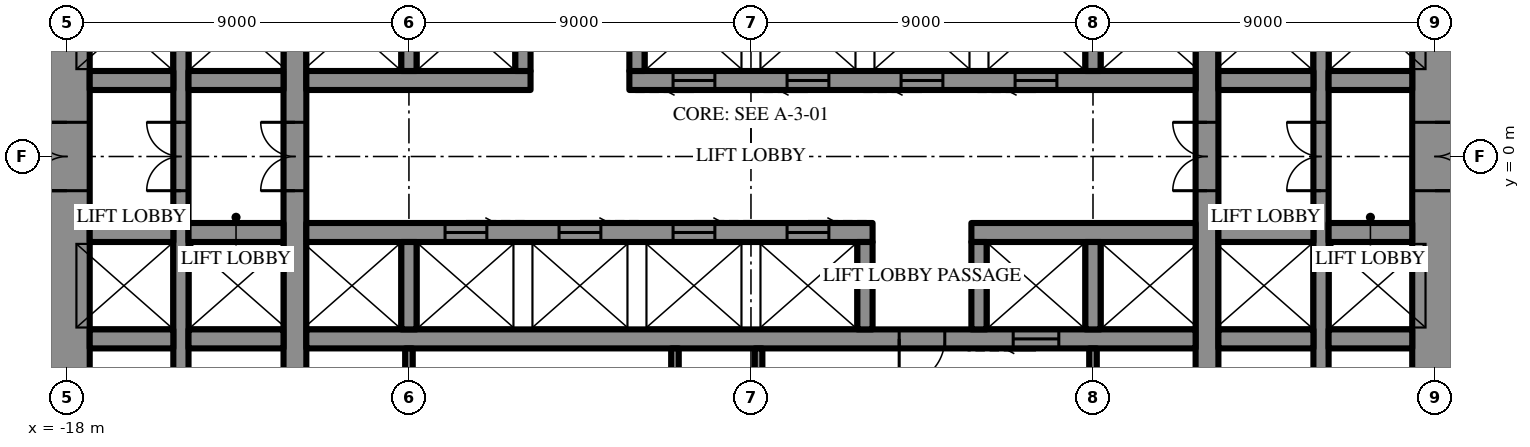
"""IFC4 building model, lengths in metres.
Left out: names, types, materials, properties, quantities, classifications, styles, units other than length and angle.
Written with IfcOpenShell. Run it as: python <this file> out.ifc"""

import sys

from ifc_helpers import new_model, si_unit, direction, frame, frame_2d, origin, place, context, subcontext, project, spatial, rectangle, extrude, element, fill, save


model = new_model("IFC4")
c1 = context("Model", 3, precision=1e-05, world=origin(), true_north=direction((0.0, 1.0)))
c2 = subcontext(c1, "Body", "Model", "MODEL_VIEW")
j1 = project(units=[si_unit("LENGTHUNIT", "METRE"), si_unit("PLANEANGLEUNIT", "RADIAN")], contexts=[c1])
p1 = place(None, origin())
s1 = spatial("IfcSite", under=j1, at=p1, CompositionType="ELEMENT")
p2 = place(p1, origin())
s2 = spatial("IfcBuilding", under=s1, at=p2, CompositionType="ELEMENT")
p3 = place(p2, frame((0.0, 0.0, 99.1)))
s3 = spatial("IfcBuildingStorey", under=s2, at=p3, CompositionType="ELEMENT", Elevation=99.1)
p4 = place(p3, frame((18.0, -10.7, 0.0), z_axis=(0.0, 0.0, 1.0), x_axis=(0.0, 1.0, 0.0)))
e1 = element("IfcWall", 1, at=p4, inside=s3, PredefinedType="SHEAR", context=c2, shape_type="SweptSolid", body=[
    extrude(rectangle(XDim=21.4, YDim=1.2, at=frame_2d((10.7, 0.0))), origin(), (0.0, 0.0, 1.0), 4.2),
])
p5 = place(p4, frame((9.8, 0.0, 0.0)))
e2 = element("IfcOpeningElement", 2, at=p5, cuts=e1, PredefinedType="OPENING", context=c2, shape_type="SweptSolid", body=[
    extrude(rectangle(XDim=1.8, YDim=2.4, at=frame_2d((0.9, 1.2))), frame((0.0, 0.61, 0.0), z_axis=(0.0, -1.0, 0.0), x_axis=(1.0, 0.0, 0.0)), (0.0, 0.0, 1.0), 1.22),
])
p6 = place(p3, frame((-18.0, 10.7, 0.0), z_axis=(0.0, 0.0, 1.0), x_axis=(0.0, -1.0, 0.0)))
e3 = element("IfcWall", 3, at=p6, inside=s3, PredefinedType="SHEAR", context=c2, shape_type="SweptSolid", body=[
    extrude(rectangle(XDim=21.4, YDim=1.2, at=frame_2d((10.7, 0.0))), origin(), (0.0, 0.0, 1.0), 4.2),
])
p7 = place(p6, frame((9.8, 0.0, 0.0)))
e4 = element("IfcOpeningElement", 4, at=p7, cuts=e3, PredefinedType="OPENING", context=c2, shape_type="SweptSolid", body=[
    extrude(rectangle(XDim=1.8, YDim=2.4, at=frame_2d((0.9, 1.2))), frame((0.0, 0.61, 0.0), z_axis=(0.0, -1.0, 0.0), x_axis=(1.0, 0.0, 0.0)), (0.0, 0.0, 1.0), 1.22),
])
p8 = place(p3, frame((12.0, -10.7, 0.0), z_axis=(0.0, 0.0, 1.0), x_axis=(0.0, 1.0, 0.0)))
e5 = element("IfcWall", 5, at=p8, inside=s3, PredefinedType="SHEAR", context=c2, shape_type="SweptSolid", body=[
    extrude(rectangle(XDim=21.4, YDim=0.6, at=frame_2d((10.7, 0.0))), origin(), (0.0, 0.0, 1.0), 4.2),
])
p9 = place(p8, frame((9.8, 0.0, 0.0)))
e6 = element("IfcOpeningElement", 6, at=p9, cuts=e5, PredefinedType="OPENING", context=c2, shape_type="SweptSolid", body=[
    extrude(rectangle(XDim=1.8, YDim=2.4, at=frame_2d((0.9, 1.2))), frame((0.0, 0.31, 0.0), z_axis=(0.0, -1.0, 0.0), x_axis=(1.0, 0.0, 0.0)), (0.0, 0.0, 1.0), 0.62),
])
p10 = place(p3, frame((-12.0, -10.7, 0.0), z_axis=(0.0, 0.0, 1.0), x_axis=(0.0, 1.0, 0.0)))
e7 = element("IfcWall", 7, at=p10, inside=s3, PredefinedType="SHEAR", context=c2, shape_type="SweptSolid", body=[
    extrude(rectangle(XDim=21.4, YDim=0.6, at=frame_2d((10.7, 0.0))), origin(), (0.0, 0.0, 1.0), 4.2),
])
p11 = place(p10, frame((9.8, 0.0, 0.0)))
e8 = element("IfcOpeningElement", 8, at=p11, cuts=e7, PredefinedType="OPENING", context=c2, shape_type="SweptSolid", body=[
    extrude(rectangle(XDim=1.8, YDim=2.4, at=frame_2d((0.9, 1.2))), frame((0.0, 0.31, 0.0), z_axis=(0.0, -1.0, 0.0), x_axis=(1.0, 0.0, 0.0)), (0.0, 0.0, 1.0), 0.62),
])
p12 = place(p3, frame((15.0, -10.7, 0.0), z_axis=(0.0, 0.0, 1.0), x_axis=(0.0, 1.0, 0.0)))
e9 = element("IfcWall", 9, at=p12, inside=s3, PredefinedType="SHEAR", context=c2, shape_type="SweptSolid", body=[
    extrude(rectangle(XDim=21.4, YDim=0.4, at=frame_2d((10.7, 0.0))), origin(), (0.0, 0.0, 1.0), 4.2),
])
p13 = place(p12, frame((9.8, 0.0, 0.0)))
e10 = element("IfcOpeningElement", 10, at=p13, cuts=e9, PredefinedType="OPENING", context=c2, shape_type="SweptSolid", body=[
    extrude(rectangle(XDim=1.8, YDim=2.4, at=frame_2d((0.9, 1.2))), frame((0.0, 0.21, 0.0), z_axis=(0.0, -1.0, 0.0), x_axis=(1.0, 0.0, 0.0)), (0.0, 0.0, 1.0), 0.42),
])
p14 = place(p3, frame((-15.0, -10.7, 0.0), z_axis=(0.0, 0.0, 1.0), x_axis=(0.0, 1.0, 0.0)))
e11 = element("IfcWall", 11, at=p14, inside=s3, PredefinedType="SHEAR", context=c2, shape_type="SweptSolid", body=[
    extrude(rectangle(XDim=21.4, YDim=0.4, at=frame_2d((10.7, 0.0))), origin(), (0.0, 0.0, 1.0), 4.2),
])
p15 = place(p14, frame((9.8, 0.0, 0.0)))
e12 = element("IfcOpeningElement", 12, at=p15, cuts=e11, PredefinedType="OPENING", context=c2, shape_type="SweptSolid", body=[
    extrude(rectangle(XDim=1.8, YDim=2.4, at=frame_2d((0.9, 1.2))), frame((0.0, 0.21, 0.0), z_axis=(0.0, -1.0, 0.0), x_axis=(1.0, 0.0, 0.0)), (0.0, 0.0, 1.0), 0.42),
])
p16 = place(p3, frame((-17.4, 2.0, 0.0), z_axis=(0.0, 0.0, 1.0), x_axis=(1.0, 0.0, 0.0)))
e13 = element("IfcWall", 13, at=p16, inside=s3, PredefinedType="SHEAR", context=c2, shape_type="SweptSolid", body=[
    extrude(rectangle(XDim=2.2, YDim=0.5, at=frame_2d((1.1, 0.0))), origin(), (0.0, 0.0, 1.0), 4.2),
])
p17 = place(p3, frame((-14.8, 2.0, 0.0), z_axis=(0.0, 0.0, 1.0), x_axis=(1.0, 0.0, 0.0)))
e14 = element("IfcWall", 14, at=p17, inside=s3, PredefinedType="SHEAR", context=c2, shape_type="SweptSolid", body=[
    extrude(rectangle(XDim=2.5, YDim=0.5, at=frame_2d((1.25, 0.0))), origin(), (0.0, 0.0, 1.0), 4.2),
])
p18 = place(p3, frame((-11.7, 2.0, 0.0), z_axis=(0.0, 0.0, 1.0), x_axis=(1.0, 0.0, 0.0)))
e15 = element("IfcWall", 15, at=p18, inside=s3, PredefinedType="SHEAR", context=c2, shape_type="SweptSolid", body=[
    extrude(rectangle(XDim=5.9, YDim=0.5, at=frame_2d((2.95, 0.0))), origin(), (0.0, 0.0, 1.0), 4.2),
])
p19 = place(p3, frame((-3.2, 2.0, 0.0), z_axis=(0.0, 0.0, 1.0), x_axis=(1.0, 0.0, 0.0)))
e16 = element("IfcWall", 16, at=p19, inside=s3, PredefinedType="SHEAR", context=c2, shape_type="SweptSolid", body=[
    extrude(rectangle(XDim=14.9, YDim=0.5, at=frame_2d((7.45, 0.0))), origin(), (0.0, 0.0, 1.0), 4.2),
])
p20 = place(p19, frame((1.15, 0.0, 0.0)))
e17 = element("IfcOpeningElement", 17, at=p20, cuts=e16, PredefinedType="OPENING", context=c2, shape_type="SweptSolid", body=[
    extrude(rectangle(XDim=1.1, YDim=2.2, at=frame_2d((0.55, 1.1))), frame((0.0, 0.26, 0.0), z_axis=(0.0, -1.0, 0.0), x_axis=(1.0, 0.0, 0.0)), (0.0, 0.0, 1.0), 0.52),
])
p21 = place(p19, frame((4.15, 0.0, 0.0)))
e18 = element("IfcOpeningElement", 18, at=p21, cuts=e16, PredefinedType="OPENING", context=c2, shape_type="SweptSolid", body=[
    extrude(rectangle(XDim=1.1, YDim=2.2, at=frame_2d((0.55, 1.1))), frame((0.0, 0.26, 0.0), z_axis=(0.0, -1.0, 0.0), x_axis=(1.0, 0.0, 0.0)), (0.0, 0.0, 1.0), 0.52),
])
p22 = place(p19, frame((7.15, 0.0, 0.0)))
e19 = element("IfcOpeningElement", 19, at=p22, cuts=e16, PredefinedType="OPENING", context=c2, shape_type="SweptSolid", body=[
    extrude(rectangle(XDim=1.1, YDim=2.2, at=frame_2d((0.55, 1.1))), frame((0.0, 0.26, 0.0), z_axis=(0.0, -1.0, 0.0), x_axis=(1.0, 0.0, 0.0)), (0.0, 0.0, 1.0), 0.52),
])
p23 = place(p19, frame((10.15, 0.0, 0.0)))
e20 = element("IfcOpeningElement", 20, at=p23, cuts=e16, PredefinedType="OPENING", context=c2, shape_type="SweptSolid", body=[
    extrude(rectangle(XDim=1.1, YDim=2.2, at=frame_2d((0.55, 1.1))), frame((0.0, 0.26, 0.0), z_axis=(0.0, -1.0, 0.0), x_axis=(1.0, 0.0, 0.0)), (0.0, 0.0, 1.0), 0.52),
])
p24 = place(p3, frame((12.3, 2.0, 0.0), z_axis=(0.0, 0.0, 1.0), x_axis=(1.0, 0.0, 0.0)))
e21 = element("IfcWall", 21, at=p24, inside=s3, PredefinedType="SHEAR", context=c2, shape_type="SweptSolid", body=[
    extrude(rectangle(XDim=2.5, YDim=0.5, at=frame_2d((1.25, 0.0))), origin(), (0.0, 0.0, 1.0), 4.2),
])
p25 = place(p3, frame((15.2, 2.0, 0.0), z_axis=(0.0, 0.0, 1.0), x_axis=(1.0, 0.0, 0.0)))
e22 = element("IfcWall", 22, at=p25, inside=s3, PredefinedType="SHEAR", context=c2, shape_type="SweptSolid", body=[
    extrude(rectangle(XDim=2.2, YDim=0.5, at=frame_2d((1.1, 0.0))), origin(), (0.0, 0.0, 1.0), 4.2),
])
for number, where, z_axis, x_axis in (
    (23, (-9.0, 2.25, 0.0), (0.0, 0.0, 1.0), (0.0, 1.0, 0.0)),
    (24, (-6.0, 2.25, 0.0), (0.0, 0.0, 1.0), (0.0, 1.0, 0.0)),
    (25, (-3.0, 2.25, 0.0), (0.0, 0.0, 1.0), (0.0, 1.0, 0.0)),
    (26, (9.0, 2.25, 0.0), (0.0, 0.0, 1.0), (0.0, 1.0, 0.0)),
):
    element("IfcWall", number, at=place(p3, frame(where, z_axis=z_axis, x_axis=x_axis)), inside=s3, PredefinedType="SHEAR", context=c2, shape_type="SweptSolid", body=[
        extrude(rectangle(XDim=2.3, YDim=0.4, at=frame_2d((1.15, 0.0))), origin(), (0.0, 0.0, 1.0), 4.2),
    ])
p26 = place(p3, frame((17.4, -2.0, 0.0), z_axis=(0.0, 0.0, 1.0), x_axis=(-1.0, 0.0, 0.0)))
e27 = element("IfcWall", 27, at=p26, inside=s3, PredefinedType="SHEAR", context=c2, shape_type="SweptSolid", body=[
    extrude(rectangle(XDim=2.2, YDim=0.5, at=frame_2d((1.1, 0.0))), origin(), (0.0, 0.0, 1.0), 4.2),
])
p27 = place(p3, frame((14.8, -2.0, 0.0), z_axis=(0.0, 0.0, 1.0), x_axis=(-1.0, 0.0, 0.0)))
e28 = element("IfcWall", 28, at=p27, inside=s3, PredefinedType="SHEAR", context=c2, shape_type="SweptSolid", body=[
    extrude(rectangle(XDim=2.5, YDim=0.5, at=frame_2d((1.25, 0.0))), origin(), (0.0, 0.0, 1.0), 4.2),
])
p28 = place(p3, frame((11.7, -2.0, 0.0), z_axis=(0.0, 0.0, 1.0), x_axis=(-1.0, 0.0, 0.0)))
e29 = element("IfcWall", 29, at=p28, inside=s3, PredefinedType="SHEAR", context=c2, shape_type="SweptSolid", body=[
    extrude(rectangle(XDim=5.9, YDim=0.5, at=frame_2d((2.95, 0.0))), origin(), (0.0, 0.0, 1.0), 4.2),
])
p29 = place(p3, frame((3.2, -2.0, 0.0), z_axis=(0.0, 0.0, 1.0), x_axis=(-1.0, 0.0, 0.0)))
e30 = element("IfcWall", 30, at=p29, inside=s3, PredefinedType="SHEAR", context=c2, shape_type="SweptSolid", body=[
    extrude(rectangle(XDim=14.9, YDim=0.5, at=frame_2d((7.45, 0.0))), origin(), (0.0, 0.0, 1.0), 4.2),
])
p30 = place(p29, frame((1.15, 0.0, 0.0)))
e31 = element("IfcOpeningElement", 31, at=p30, cuts=e30, PredefinedType="OPENING", context=c2, shape_type="SweptSolid", body=[
    extrude(rectangle(XDim=1.1, YDim=2.2, at=frame_2d((0.55, 1.1))), frame((0.0, 0.26, 0.0), z_axis=(0.0, -1.0, 0.0), x_axis=(1.0, 0.0, 0.0)), (0.0, 0.0, 1.0), 0.52),
])
p31 = place(p29, frame((4.15, 0.0, 0.0)))
e32 = element("IfcOpeningElement", 32, at=p31, cuts=e30, PredefinedType="OPENING", context=c2, shape_type="SweptSolid", body=[
    extrude(rectangle(XDim=1.1, YDim=2.2, at=frame_2d((0.55, 1.1))), frame((0.0, 0.26, 0.0), z_axis=(0.0, -1.0, 0.0), x_axis=(1.0, 0.0, 0.0)), (0.0, 0.0, 1.0), 0.52),
])
p32 = place(p29, frame((7.15, 0.0, 0.0)))
e33 = element("IfcOpeningElement", 33, at=p32, cuts=e30, PredefinedType="OPENING", context=c2, shape_type="SweptSolid", body=[
    extrude(rectangle(XDim=1.1, YDim=2.2, at=frame_2d((0.55, 1.1))), frame((0.0, 0.26, 0.0), z_axis=(0.0, -1.0, 0.0), x_axis=(1.0, 0.0, 0.0)), (0.0, 0.0, 1.0), 0.52),
])
p33 = place(p29, frame((10.15, 0.0, 0.0)))
e34 = element("IfcOpeningElement", 34, at=p33, cuts=e30, PredefinedType="OPENING", context=c2, shape_type="SweptSolid", body=[
    extrude(rectangle(XDim=1.1, YDim=2.2, at=frame_2d((0.55, 1.1))), frame((0.0, 0.26, 0.0), z_axis=(0.0, -1.0, 0.0), x_axis=(1.0, 0.0, 0.0)), (0.0, 0.0, 1.0), 0.52),
])
p34 = place(p3, frame((-12.3, -2.0, 0.0), z_axis=(0.0, 0.0, 1.0), x_axis=(-1.0, 0.0, 0.0)))
e35 = element("IfcWall", 35, at=p34, inside=s3, PredefinedType="SHEAR", context=c2, shape_type="SweptSolid", body=[
    extrude(rectangle(XDim=2.5, YDim=0.5, at=frame_2d((1.25, 0.0))), origin(), (0.0, 0.0, 1.0), 4.2),
])
for number, where, z_axis, x_axis in (
    (36, (-15.2, -2.0, 0.0), (0.0, 0.0, 1.0), (-1.0, 0.0, 0.0)),
    (37, (17.4, -4.8, 0.0), (0.0, 0.0, 1.0), (-1.0, 0.0, 0.0)),
):
    element("IfcWall", number, at=place(p3, frame(where, z_axis=z_axis, x_axis=x_axis)), inside=s3, PredefinedType="SHEAR", context=c2, shape_type="SweptSolid", body=[
        extrude(rectangle(XDim=2.2, YDim=0.5, at=frame_2d((1.1, 0.0))), origin(), (0.0, 0.0, 1.0), 4.2),
    ])
p35 = place(p3, frame((14.8, -4.8, 0.0), z_axis=(0.0, 0.0, 1.0), x_axis=(-1.0, 0.0, 0.0)))
e38 = element("IfcWall", 38, at=p35, inside=s3, PredefinedType="SHEAR", context=c2, shape_type="SweptSolid", body=[
    extrude(rectangle(XDim=2.5, YDim=0.5, at=frame_2d((1.25, 0.0))), origin(), (0.0, 0.0, 1.0), 4.2),
])
p36 = place(p3, frame((11.7, -4.8, 0.0), z_axis=(0.0, 0.0, 1.0), x_axis=(-1.0, 0.0, 0.0)))
e39 = element("IfcWall", 39, at=p36, inside=s3, PredefinedType="SHEAR", context=c2, shape_type="SweptSolid", body=[
    extrude(rectangle(XDim=23.4, YDim=0.5, at=frame_2d((11.7, 0.0))), origin(), (0.0, 0.0, 1.0), 4.2),
])
p37 = place(p36, frame((6.6, 0.0, 0.0)))
e40 = element("IfcOpeningElement", 40, at=p37, cuts=e39, PredefinedType="OPENING", context=c2, shape_type="SweptSolid", body=[
    extrude(rectangle(XDim=1.2, YDim=2.2, at=frame_2d((0.6, 1.1))), frame((0.0, 0.26, 0.0), z_axis=(0.0, -1.0, 0.0), x_axis=(1.0, 0.0, 0.0)), (0.0, 0.0, 1.0), 0.52),
])
p38 = place(p36, frame((3.6, 0.0, 0.0)))
e41 = element("IfcOpeningElement", 41, at=p38, cuts=e39, PredefinedType="OPENING", context=c2, shape_type="SweptSolid", body=[
    extrude(rectangle(XDim=1.2, YDim=2.2, at=frame_2d((0.6, 1.1))), frame((0.0, 0.26, 0.0), z_axis=(0.0, -1.0, 0.0), x_axis=(1.0, 0.0, 0.0)), (0.0, 0.0, 1.0), 0.52),
])
p39 = place(p3, frame((-12.3, -4.8, 0.0), z_axis=(0.0, 0.0, 1.0), x_axis=(-1.0, 0.0, 0.0)))
e42 = element("IfcWall", 42, at=p39, inside=s3, PredefinedType="SHEAR", context=c2, shape_type="SweptSolid", body=[
    extrude(rectangle(XDim=2.5, YDim=0.5, at=frame_2d((1.25, 0.0))), origin(), (0.0, 0.0, 1.0), 4.2),
])
p40 = place(p3, frame((-15.2, -4.8, 0.0), z_axis=(0.0, 0.0, 1.0), x_axis=(-1.0, 0.0, 0.0)))
e43 = element("IfcWall", 43, at=p40, inside=s3, PredefinedType="SHEAR", context=c2, shape_type="SweptSolid", body=[
    extrude(rectangle(XDim=2.2, YDim=0.5, at=frame_2d((1.1, 0.0))), origin(), (0.0, 0.0, 1.0), 4.2),
])
for number, where, z_axis, x_axis in (
    (44, (9.0, -2.25, 0.0), (0.0, 0.0, 1.0), (0.0, -1.0, 0.0)),
    (45, (6.0, -2.25, 0.0), (0.0, 0.0, 1.0), (0.0, -1.0, 0.0)),
    (46, (3.0, -2.25, 0.0), (0.0, 0.0, 1.0), (0.0, -1.0, 0.0)),
    (47, (-9.0, -2.25, 0.0), (0.0, 0.0, 1.0), (0.0, -1.0, 0.0)),
):
    element("IfcWall", number, at=place(p3, frame(where, z_axis=z_axis, x_axis=x_axis)), inside=s3, PredefinedType="SHEAR", context=c2, shape_type="SweptSolid", body=[
        extrude(rectangle(XDim=2.3, YDim=0.4, at=frame_2d((1.15, 0.0))), origin(), (0.0, 0.0, 1.0), 4.2),
    ])
p41 = place(p3, frame((0.2, -5.05, 0.0), z_axis=(0.0, 0.0, 1.0), x_axis=(0.0, -1.0, 0.0)))
e48 = element("IfcWall", 48, at=p41, inside=s3, PredefinedType="SHEAR", context=c2, shape_type="SweptSolid", body=[
    extrude(rectangle(XDim=5.65, YDim=0.2, at=frame_2d((2.825, 0.0))), origin(), (0.0, 0.0, 1.0), 4.2),
])
for number, where, z_axis, x_axis in (
    (49, (9.0, -5.05, 0.0), (0.0, 0.0, 1.0), (0.0, -1.0, 0.0)),
    (50, (-9.0, -5.05, 0.0), (0.0, 0.0, 1.0), (0.0, -1.0, 0.0)),
    (51, (-2.0, -5.05, 0.0), (0.0, 0.0, 1.0), (0.0, -1.0, 0.0)),
):
    element("IfcWall", number, at=place(p3, frame(where, z_axis=z_axis, x_axis=x_axis)), inside=s3, PredefinedType="PARTITIONING", context=c2, shape_type="SweptSolid", body=[
        extrude(rectangle(XDim=5.65, YDim=0.2, at=frame_2d((2.825, 0.0))), origin(), (0.0, 0.0, 1.0), 4.0),
    ])
p42 = place(p5, frame((1.8, 0.0, 0.0), z_axis=(0.0, 0.0, 1.0), x_axis=(-1.0, 0.0, 0.0)))
e52 = element("IfcDoor", 52, at=p42, inside=s3, OperationType="DOUBLE_DOOR_SINGLE_SWING", PredefinedType="DOOR", context=c2, shape_type="SweptSolid", body=[
    extrude(rectangle(XDim=1.8, YDim=2.4, at=frame_2d((0.9, 1.2))), frame((0.0, 0.025, 0.0), z_axis=(0.0, -1.0, 0.0), x_axis=(1.0, 0.0, 0.0)), (0.0, 0.0, 1.0), 0.05),
])
fill(e2, e52)
p43 = place(p7, frame((1.8, 0.0, 0.0), z_axis=(0.0, 0.0, 1.0), x_axis=(-1.0, 0.0, 0.0)))
e53 = element("IfcDoor", 53, at=p43, inside=s3, OperationType="DOUBLE_DOOR_SINGLE_SWING", PredefinedType="DOOR", context=c2, shape_type="SweptSolid", body=[
    extrude(rectangle(XDim=1.8, YDim=2.4, at=frame_2d((0.9, 1.2))), frame((0.0, 0.025, 0.0), z_axis=(0.0, -1.0, 0.0), x_axis=(1.0, 0.0, 0.0)), (0.0, 0.0, 1.0), 0.05),
])
fill(e4, e53)
p44 = place(p37, origin())
e54 = element("IfcDoor", 54, at=p44, inside=s3, OperationType="SINGLE_SWING_LEFT", PredefinedType="DOOR", context=c2, shape_type="SweptSolid", body=[
    extrude(rectangle(XDim=1.2, YDim=2.2, at=frame_2d((0.6, 1.1))), frame((0.0, 0.025, 0.0), z_axis=(0.0, -1.0, 0.0), x_axis=(1.0, 0.0, 0.0)), (0.0, 0.0, 1.0), 0.05),
])
fill(e40, e54)
p45 = place(p9, origin())
e55 = element("IfcDoor", 55, at=p45, inside=s3, OperationType="DOUBLE_DOOR_SINGLE_SWING", PredefinedType="DOOR", context=c2, shape_type="SweptSolid", body=[
    extrude(rectangle(XDim=1.8, YDim=2.4, at=frame_2d((0.9, 1.2))), frame((0.0, 0.025, 0.0), z_axis=(0.0, -1.0, 0.0), x_axis=(1.0, 0.0, 0.0)), (0.0, 0.0, 1.0), 0.05),
])
fill(e6, e55)
p46 = place(p11, origin())
e56 = element("IfcDoor", 56, at=p46, inside=s3, OperationType="DOUBLE_DOOR_SINGLE_SWING", PredefinedType="DOOR", context=c2, shape_type="SweptSolid", body=[
    extrude(rectangle(XDim=1.8, YDim=2.4, at=frame_2d((0.9, 1.2))), frame((0.0, 0.025, 0.0), z_axis=(0.0, -1.0, 0.0), x_axis=(1.0, 0.0, 0.0)), (0.0, 0.0, 1.0), 0.05),
])
fill(e8, e56)
p47 = place(p13, origin())
e57 = element("IfcDoor", 57, at=p47, inside=s3, OperationType="DOUBLE_DOOR_SINGLE_SWING", PredefinedType="DOOR", context=c2, shape_type="SweptSolid", body=[
    extrude(rectangle(XDim=1.8, YDim=2.4, at=frame_2d((0.9, 1.2))), frame((0.0, 0.025, 0.0), z_axis=(0.0, -1.0, 0.0), x_axis=(1.0, 0.0, 0.0)), (0.0, 0.0, 1.0), 0.05),
])
fill(e10, e57)
p48 = place(p15, origin())
e58 = element("IfcDoor", 58, at=p48, inside=s3, OperationType="DOUBLE_DOOR_SINGLE_SWING", PredefinedType="DOOR", context=c2, shape_type="SweptSolid", body=[
    extrude(rectangle(XDim=1.8, YDim=2.4, at=frame_2d((0.9, 1.2))), frame((0.0, 0.025, 0.0), z_axis=(0.0, -1.0, 0.0), x_axis=(1.0, 0.0, 0.0)), (0.0, 0.0, 1.0), 0.05),
])
fill(e12, e58)
p49 = place(p20, frame((1.1, 0.0, 0.0), z_axis=(0.0, 0.0, 1.0), x_axis=(-1.0, 0.0, 0.0)))
e59 = element("IfcDoor", 59, at=p49, inside=s3, OperationType="SLIDING_TO_LEFT", PredefinedType="DOOR", context=c2, shape_type="SweptSolid", body=[
    extrude(rectangle(XDim=1.1, YDim=2.2, at=frame_2d((0.55, 1.1))), frame((0.0, 0.025, 0.0), z_axis=(0.0, -1.0, 0.0), x_axis=(1.0, 0.0, 0.0)), (0.0, 0.0, 1.0), 0.05),
])
fill(e17, e59)
p50 = place(p21, frame((1.1, 0.0, 0.0), z_axis=(0.0, 0.0, 1.0), x_axis=(-1.0, 0.0, 0.0)))
e60 = element("IfcDoor", 60, at=p50, inside=s3, OperationType="SLIDING_TO_LEFT", PredefinedType="DOOR", context=c2, shape_type="SweptSolid", body=[
    extrude(rectangle(XDim=1.1, YDim=2.2, at=frame_2d((0.55, 1.1))), frame((0.0, 0.025, 0.0), z_axis=(0.0, -1.0, 0.0), x_axis=(1.0, 0.0, 0.0)), (0.0, 0.0, 1.0), 0.05),
])
fill(e18, e60)
p51 = place(p22, frame((1.1, 0.0, 0.0), z_axis=(0.0, 0.0, 1.0), x_axis=(-1.0, 0.0, 0.0)))
e61 = element("IfcDoor", 61, at=p51, inside=s3, OperationType="SLIDING_TO_LEFT", PredefinedType="DOOR", context=c2, shape_type="SweptSolid", body=[
    extrude(rectangle(XDim=1.1, YDim=2.2, at=frame_2d((0.55, 1.1))), frame((0.0, 0.025, 0.0), z_axis=(0.0, -1.0, 0.0), x_axis=(1.0, 0.0, 0.0)), (0.0, 0.0, 1.0), 0.05),
])
fill(e19, e61)
p52 = place(p23, frame((1.1, 0.0, 0.0), z_axis=(0.0, 0.0, 1.0), x_axis=(-1.0, 0.0, 0.0)))
e62 = element("IfcDoor", 62, at=p52, inside=s3, OperationType="SLIDING_TO_LEFT", PredefinedType="DOOR", context=c2, shape_type="SweptSolid", body=[
    extrude(rectangle(XDim=1.1, YDim=2.2, at=frame_2d((0.55, 1.1))), frame((0.0, 0.025, 0.0), z_axis=(0.0, -1.0, 0.0), x_axis=(1.0, 0.0, 0.0)), (0.0, 0.0, 1.0), 0.05),
])
fill(e20, e62)
p53 = place(p38, origin())
e63 = element("IfcDoor", 63, at=p53, inside=s3, OperationType="SLIDING_TO_LEFT", PredefinedType="DOOR", context=c2, shape_type="SweptSolid", body=[
    extrude(rectangle(XDim=1.2, YDim=2.2, at=frame_2d((0.6, 1.1))), frame((0.0, 0.025, 0.0), z_axis=(0.0, -1.0, 0.0), x_axis=(1.0, 0.0, 0.0)), (0.0, 0.0, 1.0), 0.05),
])
fill(e41, e63)
p54 = place(p30, frame((1.1, 0.0, 0.0), z_axis=(0.0, 0.0, 1.0), x_axis=(-1.0, 0.0, 0.0)))
e64 = element("IfcDoor", 64, at=p54, inside=s3, OperationType="SLIDING_TO_LEFT", PredefinedType="DOOR", context=c2, shape_type="SweptSolid", body=[
    extrude(rectangle(XDim=1.1, YDim=2.2, at=frame_2d((0.55, 1.1))), frame((0.0, 0.025, 0.0), z_axis=(0.0, -1.0, 0.0), x_axis=(1.0, 0.0, 0.0)), (0.0, 0.0, 1.0), 0.05),
])
fill(e31, e64)
p55 = place(p31, frame((1.1, 0.0, 0.0), z_axis=(0.0, 0.0, 1.0), x_axis=(-1.0, 0.0, 0.0)))
e65 = element("IfcDoor", 65, at=p55, inside=s3, OperationType="SLIDING_TO_LEFT", PredefinedType="DOOR", context=c2, shape_type="SweptSolid", body=[
    extrude(rectangle(XDim=1.1, YDim=2.2, at=frame_2d((0.55, 1.1))), frame((0.0, 0.025, 0.0), z_axis=(0.0, -1.0, 0.0), x_axis=(1.0, 0.0, 0.0)), (0.0, 0.0, 1.0), 0.05),
])
fill(e32, e65)
p56 = place(p32, frame((1.1, 0.0, 0.0), z_axis=(0.0, 0.0, 1.0), x_axis=(-1.0, 0.0, 0.0)))
e66 = element("IfcDoor", 66, at=p56, inside=s3, OperationType="SLIDING_TO_LEFT", PredefinedType="DOOR", context=c2, shape_type="SweptSolid", body=[
    extrude(rectangle(XDim=1.1, YDim=2.2, at=frame_2d((0.55, 1.1))), frame((0.0, 0.025, 0.0), z_axis=(0.0, -1.0, 0.0), x_axis=(1.0, 0.0, 0.0)), (0.0, 0.0, 1.0), 0.05),
])
fill(e33, e66)
p57 = place(p33, frame((1.1, 0.0, 0.0), z_axis=(0.0, 0.0, 1.0), x_axis=(-1.0, 0.0, 0.0)))
e67 = element("IfcDoor", 67, at=p57, inside=s3, OperationType="SLIDING_TO_LEFT", PredefinedType="DOOR", context=c2, shape_type="SweptSolid", body=[
    extrude(rectangle(XDim=1.1, YDim=2.2, at=frame_2d((0.55, 1.1))), frame((0.0, 0.025, 0.0), z_axis=(0.0, -1.0, 0.0), x_axis=(1.0, 0.0, 0.0)), (0.0, 0.0, 1.0), 0.05),
])
fill(e34, e67)
save(model, sys.argv[1])
